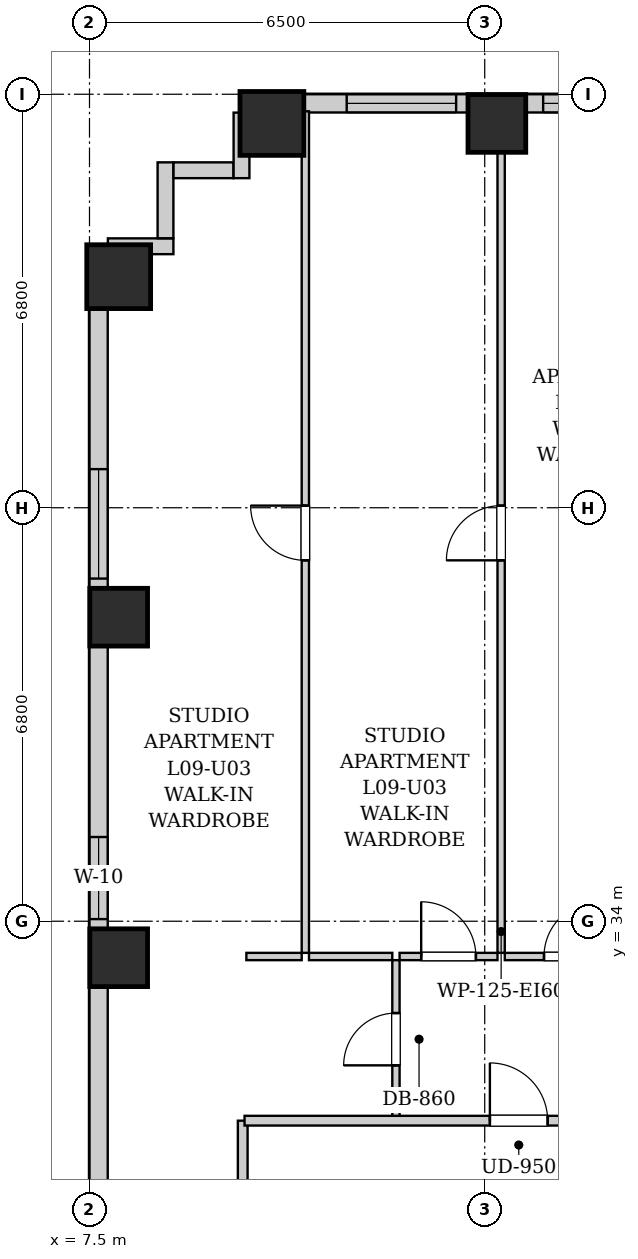
"""IFC4 building model, lengths in metres.
Left out: names, types, materials, properties, quantities, classifications, styles, units other than length and angle.
Written with IfcOpenShell. Run it as: python <this file> out.ifc"""

import sys

from ifc_helpers import new_model, si_unit, direction, frame, frame_2d, origin, origin_2d, place, context, subcontext, project, spatial, rectangle, extrude, element, fill, save


model = new_model("IFC4")
c1 = context("Model", 3, precision=1e-05, world=origin(), true_north=direction((0.0, 1.0)))
c2 = subcontext(c1, "Body", "Model", "MODEL_VIEW")
j1 = project(units=[si_unit("LENGTHUNIT", "METRE"), si_unit("PLANEANGLEUNIT", "RADIAN")], contexts=[c1])
p1 = place(None, origin())
s1 = spatial("IfcSite", under=j1, at=p1, CompositionType="ELEMENT")
p2 = place(p1, origin())
s2 = spatial("IfcBuilding", under=s1, at=p2, CompositionType="ELEMENT")
p3 = place(p2, frame((0.0, 0.0, 38.6)))
s3 = spatial("IfcBuildingStorey", under=s2, at=p3, CompositionType="ELEMENT", Elevation=38.6)
p4 = place(p3, frame((10.5, 47.12, 0.0), z_axis=(0.0, 0.0, 1.0), x_axis=(1.0, 0.0, 0.0)))
e1 = element("IfcColumn", 1, at=p4, inside=s3, PredefinedType="COLUMN", context=c2, shape_type="SweptSolid", body=[
    extrude(rectangle(XDim=1.05, YDim=1.05, at=origin_2d()), origin(), (0.0, 0.0, 1.0), 3.2),
])
for number, where, z_axis, x_axis in (
    (2, (14.2, 47.12, 0.0), (0.0, 0.0, 1.0), (1.0, 0.0, 0.0)),
    (3, (7.98, 33.4, 0.0), (0.0, 0.0, 1.0), (1.0, 0.0, 0.0)),
    (4, (7.98, 39.0, 0.0), (0.0, 0.0, 1.0), (1.0, 0.0, 0.0)),
):
    element("IfcColumn", number, at=place(p3, frame(where, z_axis=z_axis, x_axis=x_axis)), inside=s3, PredefinedType="COLUMN", context=c2, shape_type="SweptSolid", body=[
        extrude(rectangle(XDim=0.95, YDim=0.95, at=origin_2d()), origin(), (0.0, 0.0, 1.0), 3.2),
    ])
p5 = place(p3, frame((7.98, 44.6, 0.0), z_axis=(0.0, 0.0, 1.0), x_axis=(1.0, 0.0, 0.0)))
e5 = element("IfcColumn", 5, at=p5, inside=s3, PredefinedType="COLUMN", context=c2, shape_type="SweptSolid", body=[
    extrude(rectangle(XDim=1.05, YDim=1.05, at=origin_2d()), origin(), (0.0, 0.0, 1.0), 3.2),
])
p6 = place(p3, frame((10.0, 47.45, 0.0), z_axis=(0.0, 0.0, 1.0), x_axis=(1.0, 0.0, 0.0)))
e6 = element("IfcWall", 6, at=p6, inside=s3, PredefinedType="SOLIDWALL", context=c2, shape_type="SweptSolid", body=[
    extrude(rectangle(XDim=25.7, YDim=0.3, at=frame_2d((12.85, 0.0))), origin(), (0.0, 0.0, 1.0), 1.975),
])
p7 = place(p6, frame((1.73, 0.0, 0.55)))
e7 = element("IfcOpeningElement", 7, at=p7, cuts=e6, PredefinedType="OPENING", context=c2, shape_type="SweptSolid", body=[
    extrude(rectangle(XDim=1.8, YDim=1.2, at=frame_2d((0.9, 0.6))), frame((0.0, 0.16, 0.0), z_axis=(0.0, -1.0, 0.0), x_axis=(1.0, 0.0, 0.0)), (0.0, 0.0, 1.0), 0.32),
])
p8 = place(p6, frame((4.961, 0.0, 0.55)))
e8 = element("IfcOpeningElement", 8, at=p8, cuts=e6, PredefinedType="OPENING", context=c2, shape_type="SweptSolid", body=[
    extrude(rectangle(XDim=1.8, YDim=1.2, at=frame_2d((0.9, 0.6))), frame((0.0, 0.16, 0.0), z_axis=(0.0, -1.0, 0.0), x_axis=(1.0, 0.0, 0.0)), (0.0, 0.0, 1.0), 0.32),
])
p9 = place(p6, frame((8.435, 0.0, 0.55)))
e9 = element("IfcOpeningElement", 9, at=p9, cuts=e6, PredefinedType="OPENING", context=c2, shape_type="SweptSolid", body=[
    extrude(rectangle(XDim=1.8, YDim=1.2, at=frame_2d((0.9, 0.6))), frame((0.0, 0.16, 0.0), z_axis=(0.0, -1.0, 0.0), x_axis=(1.0, 0.0, 0.0)), (0.0, 0.0, 1.0), 0.32),
])
p10 = place(p6, frame((11.15, 0.0, 0.55)))
e10 = element("IfcOpeningElement", 10, at=p10, cuts=e6, PredefinedType="OPENING", context=c2, shape_type="SweptSolid", body=[
    extrude(rectangle(XDim=1.35, YDim=1.2, at=frame_2d((0.675, 0.6))), frame((0.0, 0.16, 0.0), z_axis=(0.0, -1.0, 0.0), x_axis=(1.0, 0.0, 0.0)), (0.0, 0.0, 1.0), 0.32),
])
p11 = place(p6, frame((17.812, 0.0, 0.55)))
e11 = element("IfcOpeningElement", 11, at=p11, cuts=e6, PredefinedType="OPENING", context=c2, shape_type="SweptSolid", body=[
    extrude(rectangle(XDim=1.8, YDim=1.2, at=frame_2d((0.9, 0.6))), frame((0.0, 0.16, 0.0), z_axis=(0.0, -1.0, 0.0), x_axis=(1.0, 0.0, 0.0)), (0.0, 0.0, 1.0), 0.32),
])
p12 = place(p6, frame((20.765, 0.0, 0.55)))
e12 = element("IfcOpeningElement", 12, at=p12, cuts=e6, PredefinedType="OPENING", context=c2, shape_type="SweptSolid", body=[
    extrude(rectangle(XDim=1.8, YDim=1.2, at=frame_2d((0.9, 0.6))), frame((0.0, 0.16, 0.0), z_axis=(0.0, -1.0, 0.0), x_axis=(1.0, 0.0, 0.0)), (0.0, 0.0, 1.0), 0.32),
])
p13 = place(p6, frame((23.835, 0.0, 0.55)))
e13 = element("IfcOpeningElement", 13, at=p13, cuts=e6, PredefinedType="OPENING", context=c2, shape_type="SweptSolid", body=[
    extrude(rectangle(XDim=1.35, YDim=1.2, at=frame_2d((0.675, 0.6))), frame((0.0, 0.16, 0.0), z_axis=(0.0, -1.0, 0.0), x_axis=(1.0, 0.0, 0.0)), (0.0, 0.0, 1.0), 0.32),
])
p14 = place(p3, frame((7.65, 19.4, 0.0), z_axis=(0.0, 0.0, 1.0), x_axis=(0.0, 1.0, 0.0)))
e14 = element("IfcWall", 14, at=p14, inside=s3, PredefinedType="SOLIDWALL", context=c2, shape_type="SweptSolid", body=[
    extrude(rectangle(XDim=25.7, YDim=0.3, at=frame_2d((12.85, 0.0))), origin(), (0.0, 0.0, 1.0), 1.975),
])
p15 = place(p14, frame((20.235, 0.0, 0.55)))
e15 = element("IfcOpeningElement", 15, at=p15, cuts=e14, PredefinedType="OPENING", context=c2, shape_type="SweptSolid", body=[
    extrude(rectangle(XDim=1.8, YDim=1.2, at=frame_2d((0.9, 0.6))), frame((0.0, 0.16, 0.0), z_axis=(0.0, -1.0, 0.0), x_axis=(1.0, 0.0, 0.0)), (0.0, 0.0, 1.0), 0.32),
])
p16 = place(p14, frame((14.635, 0.0, 0.55)))
e16 = element("IfcOpeningElement", 16, at=p16, cuts=e14, PredefinedType="OPENING", context=c2, shape_type="SweptSolid", body=[
    extrude(rectangle(XDim=1.35, YDim=1.2, at=frame_2d((0.675, 0.6))), frame((0.0, 0.16, 0.0), z_axis=(0.0, -1.0, 0.0), x_axis=(1.0, 0.0, 0.0)), (0.0, 0.0, 1.0), 0.32),
])
p17 = place(p14, frame((5.1, 0.0, 0.55)))
e17 = element("IfcOpeningElement", 17, at=p17, cuts=e14, PredefinedType="OPENING", context=c2, shape_type="SweptSolid", body=[
    extrude(rectangle(XDim=1.8, YDim=1.2, at=frame_2d((0.9, 0.6))), frame((0.0, 0.16, 0.0), z_axis=(0.0, -1.0, 0.0), x_axis=(1.0, 0.0, 0.0)), (0.0, 0.0, 1.0), 0.32),
])
p18 = place(p14, frame((7.16, 0.0, 0.55)))
e18 = element("IfcOpeningElement", 18, at=p18, cuts=e14, PredefinedType="OPENING", context=c2, shape_type="SweptSolid", body=[
    extrude(rectangle(XDim=1.35, YDim=1.2, at=frame_2d((0.675, 0.6))), frame((0.0, 0.16, 0.0), z_axis=(0.0, -1.0, 0.0), x_axis=(1.0, 0.0, 0.0)), (0.0, 0.0, 1.0), 0.32),
])
p19 = place(p3, frame((7.802, 45.1, 0.0), z_axis=(0.0, 0.0, 1.0), x_axis=(1.0, 0.0, 0.0)))
e19 = element("IfcWall", 19, at=p19, inside=s3, PredefinedType="SOLIDWALL", context=c2, shape_type="SweptSolid", body=[
    extrude(rectangle(XDim=1.078, YDim=0.26, at=frame_2d((0.539, 0.0))), origin(), (0.0, 0.0, 1.0), 2.94),
])
p20 = place(p3, frame((8.75, 45.232, 0.0), z_axis=(0.0, 0.0, 1.0), x_axis=(0.0, 1.0, 0.0)))
e20 = element("IfcWall", 20, at=p20, inside=s3, PredefinedType="SOLIDWALL", context=c2, shape_type="SweptSolid", body=[
    extrude(rectangle(XDim=1.248, YDim=0.26, at=frame_2d((0.624, 0.0))), origin(), (0.0, 0.0, 1.0), 2.94),
])
p21 = place(p3, frame((8.882, 46.35, 0.0), z_axis=(0.0, 0.0, 1.0), x_axis=(1.0, 0.0, 0.0)))
e21 = element("IfcWall", 21, at=p21, inside=s3, PredefinedType="SOLIDWALL", context=c2, shape_type="SweptSolid", body=[
    extrude(rectangle(XDim=0.986, YDim=0.26, at=frame_2d((0.493, 0.0))), origin(), (0.0, 0.0, 1.0), 2.94),
])
p22 = place(p3, frame((10.0, 46.22, 0.0), z_axis=(0.0, 0.0, 1.0), x_axis=(0.0, 1.0, 0.0)))
e22 = element("IfcWall", 22, at=p22, inside=s3, PredefinedType="SOLIDWALL", context=c2, shape_type="SweptSolid", body=[
    extrude(rectangle(XDim=1.078, YDim=0.26, at=frame_2d((0.539, 0.0))), origin(), (0.0, 0.0, 1.0), 2.94),
])
p23 = place(p3, frame((10.02, 28.98, 0.0), z_axis=(0.0, 0.0, 1.0), x_axis=(0.0, 1.0, 0.0)))
e23 = element("IfcWall", 23, at=p23, inside=s3, PredefinedType="PARTITIONING", context=c2, shape_type="SweptSolid", body=[
    extrude(rectangle(XDim=1.74, YDim=0.16, at=frame_2d((0.87, 0.0))), origin(), (0.0, 0.0, 1.0), 2.94),
])
p24 = place(p3, frame((12.54, 30.76, 0.0), z_axis=(0.0, 0.0, 1.0), x_axis=(0.0, 1.0, 0.0)))
e24 = element("IfcWall", 24, at=p24, inside=s3, PredefinedType="PARTITIONING", context=c2, shape_type="SweptSolid", body=[
    extrude(rectangle(XDim=2.6, YDim=0.12, at=frame_2d((1.3, 0.0))), origin(), (0.0, 0.0, 1.0), 2.94),
])
p25 = place(p24, frame((0.87, 0.0, 0.0)))
e25 = element("IfcOpeningElement", 25, at=p25, cuts=e24, PredefinedType="OPENING", context=c2, shape_type="SweptSolid", body=[
    extrude(rectangle(XDim=0.86, YDim=2.05, at=frame_2d((0.43, 1.025))), frame((0.0, 0.07, 0.0), z_axis=(0.0, -1.0, 0.0), x_axis=(1.0, 0.0, 0.0)), (0.0, 0.0, 1.0), 0.14),
])
p26 = place(p3, frame((10.08, 33.42, 0.0), z_axis=(0.0, 0.0, 1.0), x_axis=(1.0, 0.0, 0.0)))
e26 = element("IfcWall", 26, at=p26, inside=s3, PredefinedType="PARTITIONING", context=c2, shape_type="SweptSolid", body=[
    extrude(rectangle(XDim=0.91, YDim=0.12, at=frame_2d((0.455, 0.0))), origin(), (0.0, 0.0, 1.0), 2.94),
])
p27 = place(p3, frame((11.11, 33.42, 0.0), z_axis=(0.0, 0.0, 1.0), x_axis=(1.0, 0.0, 0.0)))
e27 = element("IfcWall", 27, at=p27, inside=s3, PredefinedType="PARTITIONING", context=c2, shape_type="SweptSolid", body=[
    extrude(rectangle(XDim=1.37, YDim=0.12, at=frame_2d((0.685, 0.0))), origin(), (0.0, 0.0, 1.0), 2.94),
])
p28 = place(p3, frame((12.6, 33.42, 0.0), z_axis=(0.0, 0.0, 1.0), x_axis=(1.0, 0.0, 0.0)))
e28 = element("IfcWall", 28, at=p28, inside=s3, PredefinedType="PARTITIONING", context=c2, shape_type="SweptSolid", body=[
    extrude(rectangle(XDim=1.61, YDim=0.12, at=frame_2d((0.805, 0.0))), origin(), (0.0, 0.0, 1.0), 2.94),
])
p29 = place(p28, frame((0.355, 0.0, 0.0)))
e29 = element("IfcOpeningElement", 29, at=p29, cuts=e28, PredefinedType="OPENING", context=c2, shape_type="SweptSolid", body=[
    extrude(rectangle(XDim=0.9, YDim=2.05, at=frame_2d((0.45, 1.025))), frame((0.0, 0.07, 0.0), z_axis=(0.0, -1.0, 0.0), x_axis=(1.0, 0.0, 0.0)), (0.0, 0.0, 1.0), 0.14),
])
p30 = place(p3, frame((14.33, 33.42, 0.0), z_axis=(0.0, 0.0, 1.0), x_axis=(1.0, 0.0, 0.0)))
e30 = element("IfcWall", 30, at=p30, inside=s3, PredefinedType="PARTITIONING", context=c2, shape_type="SweptSolid", body=[
    extrude(rectangle(XDim=2.19, YDim=0.12, at=frame_2d((1.095, 0.0))), origin(), (0.0, 0.0, 1.0), 2.94),
])
p31 = place(p30, frame((0.645, 0.0, 0.0)))
e31 = element("IfcOpeningElement", 31, at=p31, cuts=e30, PredefinedType="OPENING", context=c2, shape_type="SweptSolid", body=[
    extrude(rectangle(XDim=0.9, YDim=2.05, at=frame_2d((0.45, 1.025))), frame((0.0, 0.07, 0.0), z_axis=(0.0, -1.0, 0.0), x_axis=(1.0, 0.0, 0.0)), (0.0, 0.0, 1.0), 0.14),
])
p32 = place(p3, frame((11.05, 33.48, 0.0), z_axis=(0.0, 0.0, 1.0), x_axis=(0.0, 1.0, 0.0)))
e32 = element("IfcWall", 32, at=p32, inside=s3, PredefinedType="PARTITIONING", context=c2, shape_type="SweptSolid", body=[
    extrude(rectangle(XDim=13.84, YDim=0.12, at=frame_2d((6.92, 0.0))), origin(), (0.0, 0.0, 1.0), 2.94),
])
p33 = place(p32, frame((6.455, 0.0, 0.0)))
e33 = element("IfcOpeningElement", 33, at=p33, cuts=e32, PredefinedType="OPENING", context=c2, shape_type="SweptSolid", body=[
    extrude(rectangle(XDim=0.9, YDim=2.05, at=frame_2d((0.45, 1.025))), frame((0.0, 0.07, 0.0), z_axis=(0.0, -1.0, 0.0), x_axis=(1.0, 0.0, 0.0)), (0.0, 0.0, 1.0), 0.14),
])
p34 = place(p3, frame((14.27, 33.48, 0.0), z_axis=(0.0, 0.0, 1.0), x_axis=(0.0, 1.0, 0.0)))
e34 = element("IfcWall", 34, at=p34, inside=s3, PredefinedType="PARTITIONING", context=c2, shape_type="SweptSolid", body=[
    extrude(rectangle(XDim=13.84, YDim=0.12, at=frame_2d((6.92, 0.0))), origin(), (0.0, 0.0, 1.0), 2.94),
])
p35 = place(p34, frame((6.455, 0.0, 0.0)))
e35 = element("IfcOpeningElement", 35, at=p35, cuts=e34, PredefinedType="OPENING", context=c2, shape_type="SweptSolid", body=[
    extrude(rectangle(XDim=0.9, YDim=2.05, at=frame_2d((0.45, 1.025))), frame((0.0, 0.07, 0.0), z_axis=(0.0, -1.0, 0.0), x_axis=(1.0, 0.0, 0.0)), (0.0, 0.0, 1.0), 0.14),
])
p36 = place(p3, frame((10.05, 30.72, 0.0), z_axis=(0.0, 0.0, 1.0), x_axis=(1.0, 0.0, 0.0)))
e36 = element("IfcWall", 36, at=p36, inside=s3, PredefinedType="PARTITIONING", context=c2, shape_type="SweptSolid", body=[
    extrude(rectangle(XDim=33.9, YDim=0.16, at=frame_2d((16.95, 0.0))), origin(), (0.0, 0.0, 1.0), 2.94),
])
p37 = place(p36, frame((4.035, 0.0, 0.0)))
e37 = element("IfcOpeningElement", 37, at=p37, cuts=e36, PredefinedType="OPENING", context=c2, shape_type="SweptSolid", body=[
    extrude(rectangle(XDim=0.95, YDim=2.1, at=frame_2d((0.475, 1.05))), frame((0.0, 0.09, 0.0), z_axis=(0.0, -1.0, 0.0), x_axis=(1.0, 0.0, 0.0)), (0.0, 0.0, 1.0), 0.18),
])
p38 = place(p25, origin())
e38 = element("IfcDoor", 38, at=p38, inside=s3, OperationType="SINGLE_SWING_LEFT", PredefinedType="DOOR", context=c2, shape_type="SweptSolid", body=[
    extrude(rectangle(XDim=0.86, YDim=2.05, at=frame_2d((0.43, 1.025))), frame((0.0, 0.025, 0.0), z_axis=(0.0, -1.0, 0.0), x_axis=(1.0, 0.0, 0.0)), (0.0, 0.0, 1.0), 0.05),
])
fill(e25, e38)
p39 = place(p29, origin())
e39 = element("IfcDoor", 39, at=p39, inside=s3, OperationType="SINGLE_SWING_LEFT", PredefinedType="DOOR", context=c2, shape_type="SweptSolid", body=[
    extrude(rectangle(XDim=0.9, YDim=2.05, at=frame_2d((0.45, 1.025))), frame((0.0, 0.025, 0.0), z_axis=(0.0, -1.0, 0.0), x_axis=(1.0, 0.0, 0.0)), (0.0, 0.0, 1.0), 0.05),
])
fill(e29, e39)
p40 = place(p31, origin())
e40 = element("IfcDoor", 40, at=p40, inside=s3, OperationType="SINGLE_SWING_RIGHT", PredefinedType="DOOR", context=c2, shape_type="SweptSolid", body=[
    extrude(rectangle(XDim=0.9, YDim=2.05, at=frame_2d((0.45, 1.025))), frame((0.0, 0.025, 0.0), z_axis=(0.0, -1.0, 0.0), x_axis=(1.0, 0.0, 0.0)), (0.0, 0.0, 1.0), 0.05),
])
fill(e31, e40)
p41 = place(p33, origin())
e41 = element("IfcDoor", 41, at=p41, inside=s3, OperationType="SINGLE_SWING_RIGHT", PredefinedType="DOOR", context=c2, shape_type="SweptSolid", body=[
    extrude(rectangle(XDim=0.9, YDim=2.05, at=frame_2d((0.45, 1.025))), frame((0.0, 0.025, 0.0), z_axis=(0.0, -1.0, 0.0), x_axis=(1.0, 0.0, 0.0)), (0.0, 0.0, 1.0), 0.05),
])
fill(e33, e41)
p42 = place(p35, origin())
e42 = element("IfcDoor", 42, at=p42, inside=s3, OperationType="SINGLE_SWING_LEFT", PredefinedType="DOOR", context=c2, shape_type="SweptSolid", body=[
    extrude(rectangle(XDim=0.9, YDim=2.05, at=frame_2d((0.45, 1.025))), frame((0.0, 0.025, 0.0), z_axis=(0.0, -1.0, 0.0), x_axis=(1.0, 0.0, 0.0)), (0.0, 0.0, 1.0), 0.05),
])
fill(e35, e42)
p43 = place(p37, origin())
e43 = element("IfcDoor", 43, at=p43, inside=s3, OperationType="SINGLE_SWING_LEFT", PredefinedType="DOOR", context=c2, shape_type="SweptSolid", body=[
    extrude(rectangle(XDim=0.95, YDim=2.1, at=frame_2d((0.475, 1.05))), frame((0.0, 0.025, 0.0), z_axis=(0.0, -1.0, 0.0), x_axis=(1.0, 0.0, 0.0)), (0.0, 0.0, 1.0), 0.05),
])
fill(e37, e43)
p44 = place(p15, origin())
e44 = element("IfcWindow", 44, at=p44, inside=s3, PartitioningType="DOUBLE_PANEL_VERTICAL", PredefinedType="WINDOW", context=c2, shape_type="SweptSolid", body=[
    extrude(rectangle(XDim=1.8, YDim=1.2, at=frame_2d((0.9, 0.6))), frame((0.0, 0.03, 0.0), z_axis=(0.0, -1.0, 0.0), x_axis=(1.0, 0.0, 0.0)), (0.0, 0.0, 1.0), 0.06),
])
fill(e15, e44)
p45 = place(p16, origin())
e45 = element("IfcWindow", 45, at=p45, inside=s3, PartitioningType="SINGLE_PANEL", PredefinedType="WINDOW", context=c2, shape_type="SweptSolid", body=[
    extrude(rectangle(XDim=1.35, YDim=1.2, at=frame_2d((0.675, 0.6))), frame((0.0, 0.03, 0.0), z_axis=(0.0, -1.0, 0.0), x_axis=(1.0, 0.0, 0.0)), (0.0, 0.0, 1.0), 0.06),
])
fill(e16, e45)
p46 = place(p7, origin())
e46 = element("IfcWindow", 46, at=p46, inside=s3, PartitioningType="DOUBLE_PANEL_VERTICAL", PredefinedType="WINDOW", context=c2, shape_type="SweptSolid", body=[
    extrude(rectangle(XDim=1.8, YDim=1.2, at=frame_2d((0.9, 0.6))), frame((0.0, 0.03, 0.0), z_axis=(0.0, -1.0, 0.0), x_axis=(1.0, 0.0, 0.0)), (0.0, 0.0, 1.0), 0.06),
])
fill(e7, e46)
p47 = place(p8, origin())
e47 = element("IfcWindow", 47, at=p47, inside=s3, PartitioningType="DOUBLE_PANEL_VERTICAL", PredefinedType="WINDOW", context=c2, shape_type="SweptSolid", body=[
    extrude(rectangle(XDim=1.8, YDim=1.2, at=frame_2d((0.9, 0.6))), frame((0.0, 0.03, 0.0), z_axis=(0.0, -1.0, 0.0), x_axis=(1.0, 0.0, 0.0)), (0.0, 0.0, 1.0), 0.06),
])
fill(e8, e47)
save(model, sys.argv[1])
